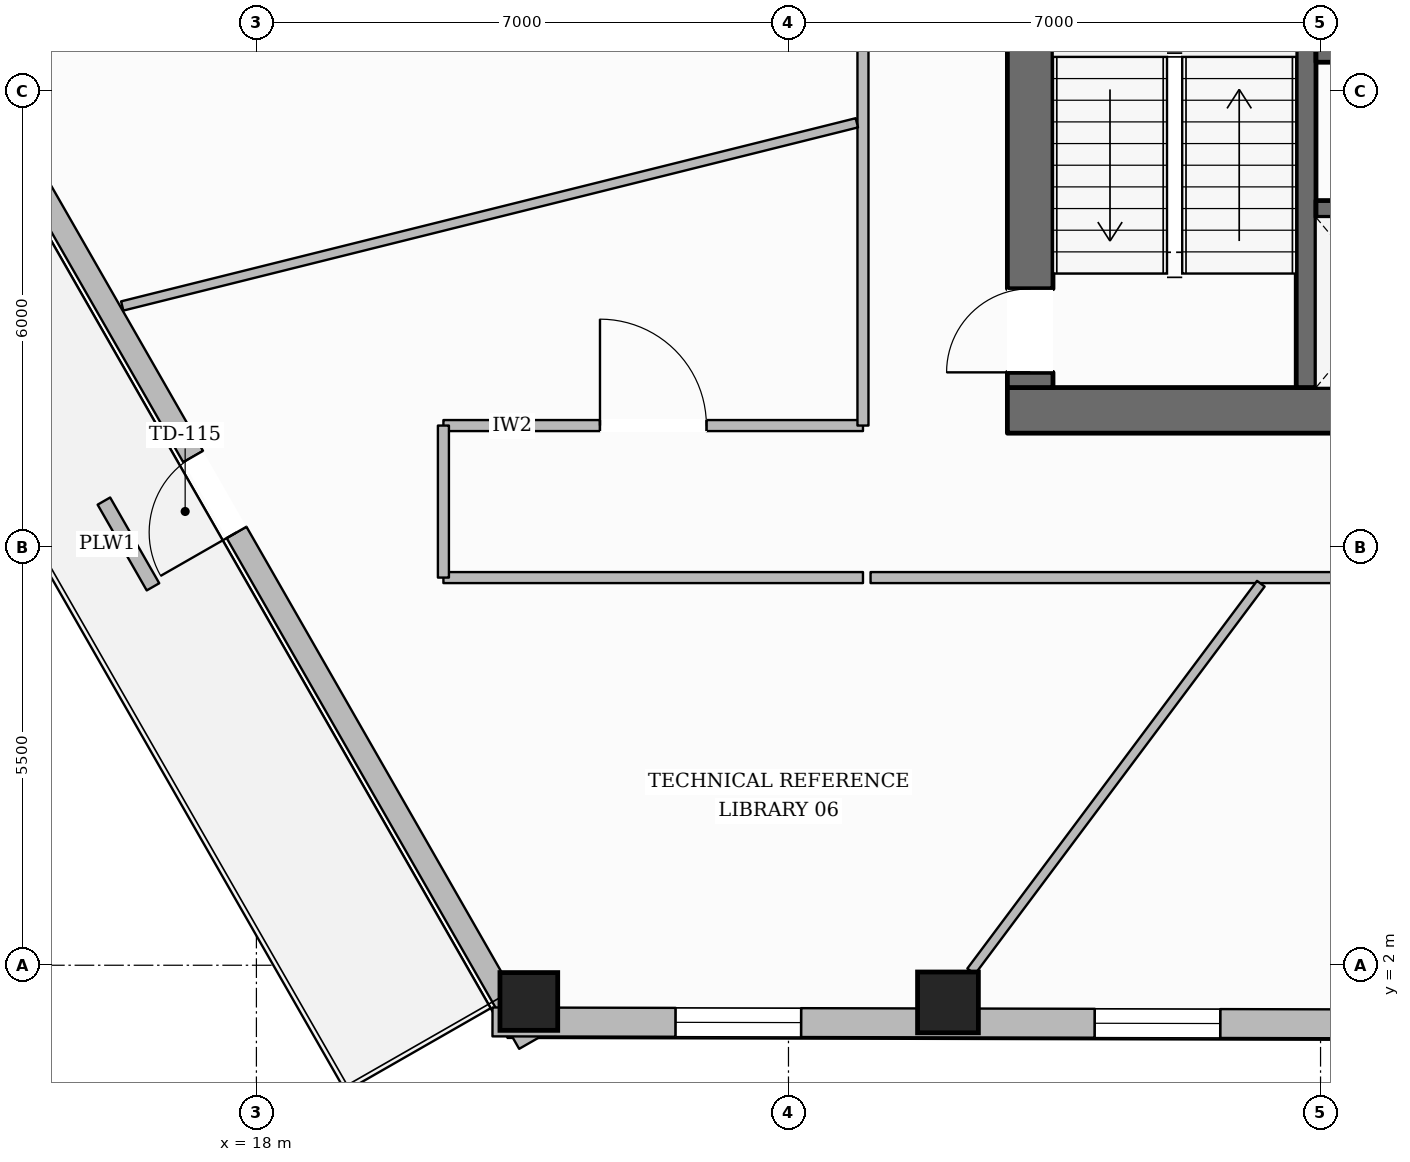
"""IFC4 building model, lengths in metres.
Left out: names, types, materials, properties, quantities, classifications, styles, units other than length and angle.
Written with IfcOpenShell. Run it as: python <this file> out.ifc"""

import sys

from ifc_helpers import new_model, si_unit, direction, frame, frame_2d, origin, origin_2d, place, context, subcontext, project, spatial, rectangle, hollow_rectangle, extrude, element, fill, save


model = new_model("IFC4")
c1 = context("Model", 3, precision=1e-05, world=origin(), true_north=direction((0.0, 1.0)))
c2 = subcontext(c1, "Body", "Model", "MODEL_VIEW")
j1 = project(units=[si_unit("LENGTHUNIT", "METRE"), si_unit("PLANEANGLEUNIT", "RADIAN")], contexts=[c1])
p1 = place(None, origin())
s1 = spatial("IfcSite", under=j1, at=p1, CompositionType="ELEMENT")
p2 = place(p1, origin())
s2 = spatial("IfcBuilding", under=s1, at=p2, CompositionType="ELEMENT")
p3 = place(p2, frame((0.0, 0.0, 32.95)))
s3 = spatial("IfcBuildingStorey", under=s2, at=p3, CompositionType="ELEMENT", Elevation=32.95)
p4 = place(p3, frame((27.88, 9.3, 0.0), z_axis=(0.0, 0.0, 1.0), x_axis=(1.0, 0.0, 0.0)))
e1 = element("IfcWall", 1, at=p4, inside=s3, PredefinedType="SOLIDWALL", context=c2, shape_type="SweptSolid", body=[
    extrude(rectangle(XDim=20.24, YDim=0.6, at=frame_2d((10.12, 0.0))), origin(), (0.0, 0.0, 1.0), 3.59),
])
p5 = place(p4, frame((10.62, 0.0, 0.0)))
e2 = element("IfcOpeningElement", 2, at=p5, cuts=e1, PredefinedType="OPENING", context=c2, shape_type="SweptSolid", body=[
    extrude(rectangle(XDim=1.4, YDim=2.2, at=frame_2d((0.7, 1.1))), frame((0.0, 0.31, 0.0), z_axis=(0.0, -1.0, 0.0), x_axis=(1.0, 0.0, 0.0)), (0.0, 0.0, 1.0), 0.62),
])
p6 = place(p3, frame((28.18, 9.6, 0.0), z_axis=(0.0, 0.0, 1.0), x_axis=(0.0, 1.0, 0.0)))
e3 = element("IfcWall", 3, at=p6, inside=s3, PredefinedType="SOLIDWALL", context=c2, shape_type="SweptSolid", body=[
    extrude(rectangle(XDim=13.0, YDim=0.6, at=frame_2d((6.5, 0.0))), origin(), (0.0, 0.0, 1.0), 3.59),
])
p7 = place(p6, frame((0.2, 0.0, 0.0)))
e4 = element("IfcOpeningElement", 4, at=p7, cuts=e3, PredefinedType="OPENING", context=c2, shape_type="SweptSolid", body=[
    extrude(rectangle(XDim=1.1, YDim=2.15, at=frame_2d((0.55, 1.075))), frame((0.0, 0.31, 0.0), z_axis=(0.0, -1.0, 0.0), x_axis=(1.0, 0.0, 0.0)), (0.0, 0.0, 1.0), 0.62),
])
p8 = place(p6, frame((8.4, 0.0, 0.0)))
e5 = element("IfcOpeningElement", 5, at=p8, cuts=e3, PredefinedType="OPENING", context=c2, shape_type="SweptSolid", body=[
    extrude(rectangle(XDim=0.9, YDim=2.1, at=frame_2d((0.45, 1.05))), frame((0.0, 0.31, 0.0), z_axis=(0.0, -1.0, 0.0), x_axis=(1.0, 0.0, 0.0)), (0.0, 0.0, 1.0), 0.62),
])
p9 = place(p3, frame((31.81, 9.6, 0.0), z_axis=(0.0, 0.0, 1.0), x_axis=(0.0, 1.0, 0.0)))
e6 = element("IfcWall", 6, at=p9, inside=s3, PredefinedType="SHEAR", context=c2, shape_type="SweptSolid", body=[
    extrude(rectangle(XDim=13.0, YDim=0.26, at=frame_2d((6.5, 0.0))), origin(), (0.0, 0.0, 1.0), 3.59),
])
p10 = place(p9, frame((10.925, 0.0, 0.0)))
e7 = element("IfcOpeningElement", 7, at=p10, cuts=e6, PredefinedType="OPENING", context=c2, shape_type="SweptSolid", body=[
    extrude(rectangle(XDim=1.25, YDim=2.25, at=frame_2d((0.625, 1.125))), frame((0.0, 0.14, 0.0), z_axis=(0.0, -1.0, 0.0), x_axis=(1.0, 0.0, 0.0)), (0.0, 0.0, 1.0), 0.28),
])
p11 = place(p3, frame((31.94, 13.99, 0.0), z_axis=(0.0, 0.0, 1.0), x_axis=(1.0, 0.0, 0.0)))
e8 = element("IfcWall", 8, at=p11, inside=s3, PredefinedType="SOLIDWALL", context=c2, shape_type="SweptSolid", body=[
    extrude(rectangle(XDim=12.12, YDim=0.22, at=frame_2d((6.06, 0.0))), origin(), (0.0, 0.0, 1.0), 3.59),
])
p12 = place(p11, frame((0.385, 0.0, 0.0)))
e9 = element("IfcOpeningElement", 9, at=p12, cuts=e8, PredefinedType="OPENING", context=c2, shape_type="SweptSolid", body=[
    extrude(rectangle(XDim=1.1, YDim=2.2, at=frame_2d((0.55, 1.1))), frame((0.0, 0.12, 0.0), z_axis=(0.0, -1.0, 0.0), x_axis=(1.0, 0.0, 0.0)), (0.0, 0.0, 1.0), 0.24),
])
p13 = place(p11, frame((2.435, 0.0, 0.0)))
e10 = element("IfcOpeningElement", 10, at=p13, cuts=e8, PredefinedType="OPENING", context=c2, shape_type="SweptSolid", body=[
    extrude(rectangle(XDim=1.1, YDim=2.2, at=frame_2d((0.55, 1.1))), frame((0.0, 0.12, 0.0), z_axis=(0.0, -1.0, 0.0), x_axis=(1.0, 0.0, 0.0)), (0.0, 0.0, 1.0), 0.24),
])
p14 = place(p11, frame((4.485, 0.0, 0.0)))
e11 = element("IfcOpeningElement", 11, at=p14, cuts=e8, PredefinedType="OPENING", context=c2, shape_type="SweptSolid", body=[
    extrude(rectangle(XDim=1.1, YDim=2.2, at=frame_2d((0.55, 1.1))), frame((0.0, 0.12, 0.0), z_axis=(0.0, -1.0, 0.0), x_axis=(1.0, 0.0, 0.0)), (0.0, 0.0, 1.0), 0.24),
])
p15 = place(p3, frame((31.94, 11.95, 0.0), z_axis=(0.0, 0.0, 1.0), x_axis=(1.0, 0.0, 0.0)))
e12 = element("IfcWall", 12, at=p15, inside=s3, PredefinedType="SOLIDWALL", context=c2, shape_type="SweptSolid", body=[
    extrude(rectangle(XDim=6.19, YDim=0.22, at=frame_2d((3.095, 0.0))), origin(), (0.0, 0.0, 1.0), 3.59),
])
p16 = place(p3, frame((21.584, 1.523, 0.0), z_axis=(0.0, 0.0, 1.0), x_axis=(1.0, 0.0, 0.0)))
e13 = element("IfcColumn", 13, at=p16, inside=s3, PredefinedType="COLUMN", context=c2, shape_type="SweptSolid", body=[
    extrude(hollow_rectangle(XDim=0.76, YDim=0.76, WallThickness=0.035, at=origin_2d()), origin(), (0.0, 0.0, 1.0), 3.59),
])
p17 = place(p3, frame((27.098, 1.511, 0.0), z_axis=(0.0, 0.0, 1.0), x_axis=(1.0, 0.0, 0.0)))
e14 = element("IfcColumn", 14, at=p17, inside=s3, PredefinedType="COLUMN", context=c2, shape_type="SweptSolid", body=[
    extrude(hollow_rectangle(XDim=0.8, YDim=0.8, WallThickness=0.036, at=origin_2d()), origin(), (0.0, 0.0, 1.0), 3.59),
])
p18 = place(p3, frame((21.587, 0.975, 0.0), z_axis=(0.0, 0.0, 1.0), x_axis=(-0.496963642145, 0.867771362967, 0.0)))
e15 = element("IfcWall", 15, at=p18, inside=s3, PredefinedType="STANDARD", context=c2, shape_type="SweptSolid", body=[
    extrude(rectangle(XDim=16.637, YDim=0.3, at=frame_2d((8.319, 0.0))), origin(), (0.0, 0.0, 1.0), 2.97),
])
p19 = place(p18, frame((7.743, 0.0, 0.0)))
e16 = element("IfcOpeningElement", 16, at=p19, cuts=e15, PredefinedType="OPENING", context=c2, shape_type="SweptSolid", body=[
    extrude(rectangle(XDim=1.15, YDim=2.2, at=frame_2d((0.575, 1.1))), frame((0.0, 0.16, 0.0), z_axis=(0.0, -1.0, 0.0), x_axis=(1.0, 0.0, 0.0)), (0.0, 0.0, 1.0), 0.32),
])
p20 = place(p3, frame((55.149, 1.179, 0.0), z_axis=(0.0, 0.0, 1.0), x_axis=(-0.999997528713, 0.002223188878, 0.0)))
e17 = element("IfcWall", 17, at=p20, inside=s3, PredefinedType="STANDARD", context=c2, shape_type="SweptSolid", body=[
    extrude(rectangle(XDim=34.043, YDim=0.38, at=frame_2d((17.021, 0.0))), origin(), (0.0, 0.0, 1.0), 2.97),
])
p21 = place(p20, frame((29.983, 0.0, 0.65)))
e18 = element("IfcOpeningElement", 18, at=p21, cuts=e17, PredefinedType="OPENING", context=c2, shape_type="SweptSolid", body=[
    extrude(rectangle(XDim=1.65, YDim=1.75, at=frame_2d((0.825, 0.875))), frame((0.0, 0.2, 0.0), z_axis=(0.0, -1.0, 0.0), x_axis=(1.0, 0.0, 0.0)), (0.0, 0.0, 1.0), 0.4),
])
p22 = place(p20, frame((24.469, 0.0, 0.65)))
e19 = element("IfcOpeningElement", 19, at=p22, cuts=e17, PredefinedType="OPENING", context=c2, shape_type="SweptSolid", body=[
    extrude(rectangle(XDim=1.65, YDim=1.75, at=frame_2d((0.825, 0.875))), frame((0.0, 0.2, 0.0), z_axis=(0.0, -1.0, 0.0), x_axis=(1.0, 0.0, 0.0)), (0.0, 0.0, 1.0), 0.4),
])
p23 = place(p20, frame((18.955, 0.0, 0.65)))
e20 = element("IfcOpeningElement", 20, at=p23, cuts=e17, PredefinedType="OPENING", context=c2, shape_type="SweptSolid", body=[
    extrude(rectangle(XDim=1.65, YDim=1.75, at=frame_2d((0.825, 0.875))), frame((0.0, 0.2, 0.0), z_axis=(0.0, -1.0, 0.0), x_axis=(1.0, 0.0, 0.0)), (0.0, 0.0, 1.0), 0.4),
])
p24 = place(p20, frame((7.926, 0.0, 0.65)))
e21 = element("IfcOpeningElement", 21, at=p24, cuts=e17, PredefinedType="OPENING", context=c2, shape_type="SweptSolid", body=[
    extrude(rectangle(XDim=1.65, YDim=1.75, at=frame_2d((0.825, 0.875))), frame((0.0, 0.2, 0.0), z_axis=(0.0, -1.0, 0.0), x_axis=(1.0, 0.0, 0.0)), (0.0, 0.0, 1.0), 0.4),
])
p25 = place(p20, frame((2.412, 0.0, 0.65)))
e22 = element("IfcOpeningElement", 22, at=p25, cuts=e17, PredefinedType="OPENING", context=c2, shape_type="SweptSolid", body=[
    extrude(rectangle(XDim=1.65, YDim=1.75, at=frame_2d((0.825, 0.875))), frame((0.0, 0.2, 0.0), z_axis=(0.0, -1.0, 0.0), x_axis=(1.0, 0.0, 0.0)), (0.0, 0.0, 1.0), 0.4),
])
p26 = place(p3, frame((15.993, 8.106, 0.0), z_axis=(0.0, 0.0, 1.0), x_axis=(0.49690726154, -0.867803649122, 0.0)))
e23 = element("IfcWall", 23, at=p26, inside=s3, PredefinedType="USERDEFINED", context=c2, shape_type="SweptSolid", body=[
    extrude(rectangle(XDim=1.3, YDim=0.19, at=frame_2d((0.65, 0.0))), origin(), (0.0, 0.0, 1.0), 0.52),
])
p27 = place(p3, frame((20.46, 9.1, 0.0), z_axis=(0.0, 0.0, 1.0), x_axis=(1.0, 0.0, 0.0)))
e24 = element("IfcWall", 24, at=p27, inside=s3, PredefinedType="PARTITIONING", context=c2, shape_type="SweptSolid", body=[
    extrude(rectangle(XDim=5.52, YDim=0.145, at=frame_2d((2.76, 0.0))), origin(), (0.0, 0.0, 1.0), 3.59),
])
p28 = place(p27, frame((2.06, 0.0, 0.0)))
e25 = element("IfcOpeningElement", 25, at=p28, cuts=e24, PredefinedType="OPENING", context=c2, shape_type="SweptSolid", body=[
    extrude(rectangle(XDim=1.4, YDim=2.2, at=frame_2d((0.7, 1.1))), frame((0.0, 0.083, 0.0), z_axis=(0.0, -1.0, 0.0), x_axis=(1.0, 0.0, 0.0)), (0.0, 0.0, 1.0), 0.165),
])
p29 = place(p3, frame((25.98, 9.1, 0.0), z_axis=(0.0, 0.0, 1.0), x_axis=(0.0, 1.0, 0.0)))
e26 = element("IfcWall", 26, at=p29, inside=s3, PredefinedType="PARTITIONING", context=c2, shape_type="SweptSolid", body=[
    extrude(rectangle(XDim=16.0, YDim=0.145, at=frame_2d((8.0, 0.0))), origin(), (0.0, 0.0, 1.0), 3.278),
])
p30 = place(p29, frame((13.93, 0.0, 0.0)))
e27 = element("IfcOpeningElement", 27, at=p30, cuts=e26, PredefinedType="OPENING", context=c2, shape_type="SweptSolid", body=[
    extrude(rectangle(XDim=0.98, YDim=2.15, at=frame_2d((0.49, 1.075))), frame((0.0, 0.083, 0.0), z_axis=(0.0, -1.0, 0.0), x_axis=(1.0, 0.0, 0.0)), (0.0, 0.0, 1.0), 0.165),
])
p31 = place(p29, frame((7.595, 0.0, 0.0)))
e28 = element("IfcOpeningElement", 28, at=p31, cuts=e26, PredefinedType="OPENING", context=c2, shape_type="SweptSolid", body=[
    extrude(rectangle(XDim=1.4, YDim=2.2, at=frame_2d((0.7, 1.1))), frame((0.0, 0.083, 0.0), z_axis=(0.0, -1.0, 0.0), x_axis=(1.0, 0.0, 0.0)), (0.0, 0.0, 1.0), 0.165),
])
p32 = place(p3, frame((49.92, 7.1, 0.0), z_axis=(0.0, 0.0, 1.0), x_axis=(-1.0, 0.0, 0.0)))
e29 = element("IfcWall", 29, at=p32, inside=s3, PredefinedType="PARTITIONING", context=c2, shape_type="SweptSolid", body=[
    extrude(rectangle(XDim=23.84, YDim=0.145, at=frame_2d((11.92, 0.0))), origin(), (0.0, 0.0, 1.0), 3.278),
])
p33 = place(p32, frame((11.154, 0.0, 0.0)))
e30 = element("IfcOpeningElement", 30, at=p33, cuts=e29, PredefinedType="OPENING", context=c2, shape_type="SweptSolid", body=[
    extrude(rectangle(XDim=1.4, YDim=2.2, at=frame_2d((0.7, 1.1))), frame((0.0, 0.083, 0.0), z_axis=(0.0, -1.0, 0.0), x_axis=(1.0, 0.0, 0.0)), (0.0, 0.0, 1.0), 0.165),
])
p34 = place(p3, frame((25.98, 7.1, 0.0), z_axis=(0.0, 0.0, 1.0), x_axis=(-1.0, 0.0, 0.0)))
e31 = element("IfcWall", 31, at=p34, inside=s3, PredefinedType="PARTITIONING", context=c2, shape_type="SweptSolid", body=[
    extrude(rectangle(XDim=5.52, YDim=0.145, at=frame_2d((2.76, 0.0))), origin(), (0.0, 0.0, 1.0), 3.59),
])
p35 = place(p3, frame((20.46, 7.1, 0.0), z_axis=(0.0, 0.0, 1.0), x_axis=(0.0, 1.0, 0.0)))
e32 = element("IfcWall", 32, at=p35, inside=s3, PredefinedType="PARTITIONING", context=c2, shape_type="SweptSolid", body=[
    extrude(rectangle(XDim=2.0, YDim=0.145, at=frame_2d((1.0, 0.0))), origin(), (0.0, 0.0, 1.0), 3.59),
])
p36 = place(p3, frame((25.899, 13.083, 0.0), z_axis=(0.0, 0.0, 1.0), x_axis=(-0.970296575764, -0.241918488463, 0.0)))
e33 = element("IfcWall", 33, at=p36, inside=s3, PredefinedType="PARTITIONING", context=c2, shape_type="SweptSolid", body=[
    extrude(rectangle(XDim=9.961, YDim=0.125, at=frame_2d((4.98, 0.0))), origin(), (0.0, 0.0, 1.0), 3.59),
])
p37 = place(p3, frame((31.215, 7.02, 0.0), z_axis=(0.0, 0.0, 1.0), x_axis=(-0.598618740795, -0.80103408365, 0.0)))
e34 = element("IfcWall", 34, at=p37, inside=s3, PredefinedType="PARTITIONING", context=c2, shape_type="SweptSolid", body=[
    extrude(rectangle(XDim=6.367, YDim=0.125, at=frame_2d((3.184, 0.0))), origin(), (0.0, 0.0, 1.0), 3.59),
])
p38 = place(p19, origin())
e35 = element("IfcDoor", 35, at=p38, inside=s3, OperationType="SINGLE_SWING_LEFT", PredefinedType="DOOR", context=c2, shape_type="SweptSolid", body=[
    extrude(rectangle(XDim=1.15, YDim=2.2, at=frame_2d((0.575, 1.1))), frame((0.0, 0.025, 0.0), z_axis=(0.0, -1.0, 0.0), x_axis=(1.0, 0.0, 0.0)), (0.0, 0.0, 1.0), 0.05),
])
fill(e16, e35)
p39 = place(p21, origin())
e36 = element("IfcWindow", 36, at=p39, inside=s3, PartitioningType="SINGLE_PANEL", PredefinedType="WINDOW", context=c2, shape_type="SweptSolid", body=[
    extrude(rectangle(XDim=1.65, YDim=1.75, at=frame_2d((0.825, 0.875))), frame((0.0, 0.03, 0.0), z_axis=(0.0, -1.0, 0.0), x_axis=(1.0, 0.0, 0.0)), (0.0, 0.0, 1.0), 0.06),
])
fill(e18, e36)
p40 = place(p22, origin())
e37 = element("IfcWindow", 37, at=p40, inside=s3, PartitioningType="SINGLE_PANEL", PredefinedType="WINDOW", context=c2, shape_type="SweptSolid", body=[
    extrude(rectangle(XDim=1.65, YDim=1.75, at=frame_2d((0.825, 0.875))), frame((0.0, 0.03, 0.0), z_axis=(0.0, -1.0, 0.0), x_axis=(1.0, 0.0, 0.0)), (0.0, 0.0, 1.0), 0.06),
])
fill(e19, e37)
p41 = place(p7, origin())
e38 = element("IfcDoor", 38, at=p41, inside=s3, OperationType="SINGLE_SWING_LEFT", PredefinedType="DOOR", context=c2, shape_type="SweptSolid", body=[
    extrude(rectangle(XDim=1.1, YDim=2.15, at=frame_2d((0.55, 1.075))), frame((0.0, 0.025, 0.0), z_axis=(0.0, -1.0, 0.0), x_axis=(1.0, 0.0, 0.0)), (0.0, 0.0, 1.0), 0.05),
])
fill(e4, e38)
p42 = place(p28, origin())
e39 = element("IfcDoor", 39, at=p42, inside=s3, OperationType="SINGLE_SWING_LEFT", PredefinedType="DOOR", context=c2, shape_type="SweptSolid", body=[
    extrude(rectangle(XDim=1.4, YDim=2.2, at=frame_2d((0.7, 1.1))), frame((0.0, 0.025, 0.0), z_axis=(0.0, -1.0, 0.0), x_axis=(1.0, 0.0, 0.0)), (0.0, 0.0, 1.0), 0.05),
])
fill(e25, e39)
save(model, sys.argv[1])
